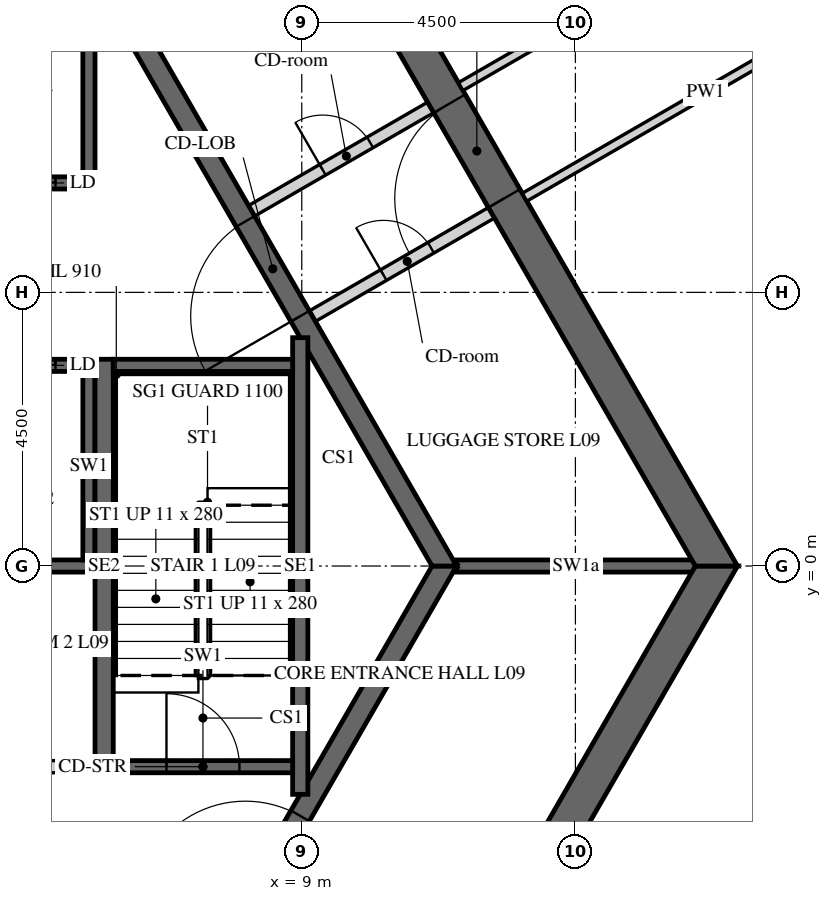
"""IFC4 building model, lengths in metres.
Left out: names, types, materials, properties, quantities, classifications, styles, units other than length and angle.
Written with IfcOpenShell. Run it as: python <this file> out.ifc"""

import sys

from ifc_helpers import new_model, si_unit, direction, frame, frame_2d, origin, place, context, subcontext, project, spatial, polyline, rectangle, outline, extrude, element, fill, save


model = new_model("IFC4")
c1 = context("Model", 3, precision=1e-05, world=origin(), true_north=direction((0.0, 1.0)))
c2 = subcontext(c1, "Body", "Model", "MODEL_VIEW")
j1 = project(units=[si_unit("LENGTHUNIT", "METRE"), si_unit("PLANEANGLEUNIT", "RADIAN")], contexts=[c1])
p1 = place(None, origin())
s1 = spatial("IfcSite", under=j1, at=p1, CompositionType="ELEMENT")
p2 = place(p1, origin())
s2 = spatial("IfcBuilding", under=s1, at=p2, CompositionType="ELEMENT")
p3 = place(p2, frame((0.0, 0.0, 49.2)))
s3 = spatial("IfcBuildingStorey", under=s2, at=p3, CompositionType="ELEMENT", Elevation=49.2)
p4 = place(p3, frame((7.91, -13.7, -0.15), z_axis=(0.0, 0.0, 1.0), x_axis=(0.499999880136, 0.866025472988, 0.0)))
e1 = element("IfcWall", 1, at=p4, inside=s3, PredefinedType="SHEAR", context=c2, shape_type="SweptSolid", body=[
    extrude(outline(polyline([(-0.173, -0.3), (15.993, -0.3), (15.646, 0.3), (0.173, 0.3), (-0.173, -0.3)])), origin(), (0.0, 0.0, 1.0), 3.9),
])
p5 = place(p4, frame((7.039, 0.0, 0.15)))
e2 = element("IfcOpeningElement", 2, at=p5, cuts=e1, PredefinedType="OPENING", context=c2, shape_type="SweptSolid", body=[
    extrude(rectangle(XDim=1.8, YDim=2.4, at=frame_2d((0.9, 1.2))), frame((0.0, 0.31, 0.0), z_axis=(0.0, -1.0, 0.0), x_axis=(1.0, 0.0, 0.0)), (0.0, 0.0, 1.0), 0.62),
])
p6 = place(p3, frame((15.819, 0.0, -0.15), z_axis=(0.0, 0.0, 1.0), x_axis=(-0.499999880136, 0.866025472988, 0.0)))
e3 = element("IfcWall", 3, at=p6, inside=s3, PredefinedType="SHEAR", context=c2, shape_type="SweptSolid", body=[
    extrude(outline(polyline([(-0.173, -0.3), (15.993, -0.3), (15.646, 0.3), (0.173, 0.3), (-0.173, -0.3)])), origin(), (0.0, 0.0, 1.0), 3.9),
])
p7 = place(p6, frame((6.981, 0.0, 0.15)))
e4 = element("IfcOpeningElement", 4, at=p7, cuts=e3, PredefinedType="OPENING", context=c2, shape_type="SweptSolid", body=[
    extrude(rectangle(XDim=1.8, YDim=2.4, at=frame_2d((0.9, 1.2))), frame((0.0, 0.31, 0.0), z_axis=(0.0, -1.0, 0.0), x_axis=(1.0, 0.0, 0.0)), (0.0, 0.0, 1.0), 0.62),
])
p8 = place(p3, frame((5.673, -9.825, -0.15), z_axis=(0.0, 0.0, 1.0), x_axis=(0.499995046907, 0.866028263435, 0.0)))
e5 = element("IfcWall", 5, at=p8, inside=s3, PredefinedType="SHEAR", context=c2, shape_type="SweptSolid", body=[
    extrude(outline(polyline([(-0.101, -0.175), (11.446, -0.175), (11.244, 0.175), (0.101, 0.175), (-0.101, -0.175)])), origin(), (0.0, 0.0, 1.0), 3.9),
])
p9 = place(p8, frame((4.801, 0.0, 0.15)))
e6 = element("IfcOpeningElement", 6, at=p9, cuts=e5, PredefinedType="OPENING", context=c2, shape_type="SweptSolid", body=[
    extrude(rectangle(XDim=1.8, YDim=2.4, at=frame_2d((0.9, 1.2))), frame((0.0, 0.185, 0.0), z_axis=(0.0, -1.0, 0.0), x_axis=(1.0, 0.0, 0.0)), (0.0, 0.0, 1.0), 0.37),
])
p10 = place(p3, frame((11.345, 0.0, -0.15), z_axis=(0.0, 0.0, 1.0), x_axis=(-0.499995046907, 0.866028263435, 0.0)))
e7 = element("IfcWall", 7, at=p10, inside=s3, PredefinedType="SHEAR", context=c2, shape_type="SweptSolid", body=[
    extrude(outline(polyline([(-0.101, -0.175), (11.446, -0.175), (11.244, 0.175), (0.101, 0.175), (-0.101, -0.175)])), origin(), (0.0, 0.0, 1.0), 3.9),
])
p11 = place(p10, frame((4.744, 0.0, 0.15)))
e8 = element("IfcOpeningElement", 8, at=p11, cuts=e7, PredefinedType="OPENING", context=c2, shape_type="SweptSolid", body=[
    extrude(rectangle(XDim=1.8, YDim=2.4, at=frame_2d((0.9, 1.2))), frame((0.0, 0.185, 0.0), z_axis=(0.0, -1.0, 0.0), x_axis=(1.0, 0.0, 0.0)), (0.0, 0.0, 1.0), 0.37),
])
p12 = place(p3, frame((-5.6, 6.3, -0.25), z_axis=(0.0, 0.0, 1.0), x_axis=(1.0, 0.0, 0.0)))
e9 = element("IfcWall", 9, at=p12, inside=s3, PredefinedType="SHEAR", context=c2, shape_type="SweptSolid", body=[
    extrude(rectangle(XDim=11.2, YDim=0.2, at=frame_2d((5.6, 0.0))), origin(), (0.0, 0.0, 1.0), 3.9),
])
p13 = place(p12, frame((0.65, 0.0, 0.25)))
e10 = element("IfcOpeningElement", 10, at=p13, cuts=e9, PredefinedType="OPENING", context=c2, shape_type="SweptSolid", body=[
    extrude(rectangle(XDim=1.1, YDim=2.1, at=frame_2d((0.55, 1.05))), frame((0.0, 0.11, 0.0), z_axis=(0.0, -1.0, 0.0), x_axis=(1.0, 0.0, 0.0)), (0.0, 0.0, 1.0), 0.22),
])
p14 = place(p12, frame((2.85, 0.0, 0.25)))
e11 = element("IfcOpeningElement", 11, at=p14, cuts=e9, PredefinedType="OPENING", context=c2, shape_type="SweptSolid", body=[
    extrude(rectangle(XDim=1.1, YDim=2.1, at=frame_2d((0.55, 1.05))), frame((0.0, 0.11, 0.0), z_axis=(0.0, -1.0, 0.0), x_axis=(1.0, 0.0, 0.0)), (0.0, 0.0, 1.0), 0.22),
])
p15 = place(p12, frame((5.05, 0.0, 0.25)))
e12 = element("IfcOpeningElement", 12, at=p15, cuts=e9, PredefinedType="OPENING", context=c2, shape_type="SweptSolid", body=[
    extrude(rectangle(XDim=1.1, YDim=2.1, at=frame_2d((0.55, 1.05))), frame((0.0, 0.11, 0.0), z_axis=(0.0, -1.0, 0.0), x_axis=(1.0, 0.0, 0.0)), (0.0, 0.0, 1.0), 0.22),
])
p16 = place(p12, frame((7.25, 0.0, 0.25)))
e13 = element("IfcOpeningElement", 13, at=p16, cuts=e9, PredefinedType="OPENING", context=c2, shape_type="SweptSolid", body=[
    extrude(rectangle(XDim=1.1, YDim=2.1, at=frame_2d((0.55, 1.05))), frame((0.0, 0.11, 0.0), z_axis=(0.0, -1.0, 0.0), x_axis=(1.0, 0.0, 0.0)), (0.0, 0.0, 1.0), 0.22),
])
p17 = place(p12, frame((9.45, 0.0, 0.25)))
e14 = element("IfcOpeningElement", 14, at=p17, cuts=e9, PredefinedType="OPENING", context=c2, shape_type="SweptSolid", body=[
    extrude(rectangle(XDim=1.1, YDim=2.1, at=frame_2d((0.55, 1.05))), frame((0.0, 0.11, 0.0), z_axis=(0.0, -1.0, 0.0), x_axis=(1.0, 0.0, 0.0)), (0.0, 0.0, 1.0), 0.22),
])
p18 = place(p3, frame((5.5, 6.4, -0.25), z_axis=(0.0, 0.0, 1.0), x_axis=(0.0, 1.0, 0.0)))
e15 = element("IfcWall", 15, at=p18, inside=s3, PredefinedType="SHEAR", context=c2, shape_type="SweptSolid", body=[
    extrude(rectangle(XDim=2.9, YDim=0.2, at=frame_2d((1.45, 0.0))), origin(), (0.0, 0.0, 1.0), 3.9),
])
p19 = place(p3, frame((-5.6, 3.3, -0.25), z_axis=(0.0, 0.0, 1.0), x_axis=(1.0, 0.0, 0.0)))
e16 = element("IfcWall", 16, at=p19, inside=s3, PredefinedType="SHEAR", context=c2, shape_type="SweptSolid", body=[
    extrude(rectangle(XDim=11.2, YDim=0.2, at=frame_2d((5.6, 0.0))), origin(), (0.0, 0.0, 1.0), 3.9),
])
p20 = place(p19, frame((0.65, 0.0, 0.25)))
e17 = element("IfcOpeningElement", 17, at=p20, cuts=e16, PredefinedType="OPENING", context=c2, shape_type="SweptSolid", body=[
    extrude(rectangle(XDim=1.1, YDim=2.1, at=frame_2d((0.55, 1.05))), frame((0.0, 0.11, 0.0), z_axis=(0.0, -1.0, 0.0), x_axis=(1.0, 0.0, 0.0)), (0.0, 0.0, 1.0), 0.22),
])
p21 = place(p19, frame((2.85, 0.0, 0.25)))
e18 = element("IfcOpeningElement", 18, at=p21, cuts=e16, PredefinedType="OPENING", context=c2, shape_type="SweptSolid", body=[
    extrude(rectangle(XDim=1.1, YDim=2.1, at=frame_2d((0.55, 1.05))), frame((0.0, 0.11, 0.0), z_axis=(0.0, -1.0, 0.0), x_axis=(1.0, 0.0, 0.0)), (0.0, 0.0, 1.0), 0.22),
])
p22 = place(p19, frame((5.05, 0.0, 0.25)))
e19 = element("IfcOpeningElement", 19, at=p22, cuts=e16, PredefinedType="OPENING", context=c2, shape_type="SweptSolid", body=[
    extrude(rectangle(XDim=1.1, YDim=2.1, at=frame_2d((0.55, 1.05))), frame((0.0, 0.11, 0.0), z_axis=(0.0, -1.0, 0.0), x_axis=(1.0, 0.0, 0.0)), (0.0, 0.0, 1.0), 0.22),
])
p23 = place(p19, frame((7.25, 0.0, 0.25)))
e20 = element("IfcOpeningElement", 20, at=p23, cuts=e16, PredefinedType="OPENING", context=c2, shape_type="SweptSolid", body=[
    extrude(rectangle(XDim=1.1, YDim=2.1, at=frame_2d((0.55, 1.05))), frame((0.0, 0.11, 0.0), z_axis=(0.0, -1.0, 0.0), x_axis=(1.0, 0.0, 0.0)), (0.0, 0.0, 1.0), 0.22),
])
p24 = place(p19, frame((9.45, 0.0, 0.25)))
e21 = element("IfcOpeningElement", 21, at=p24, cuts=e16, PredefinedType="OPENING", context=c2, shape_type="SweptSolid", body=[
    extrude(rectangle(XDim=1.1, YDim=2.1, at=frame_2d((0.55, 1.05))), frame((0.0, 0.11, 0.0), z_axis=(0.0, -1.0, 0.0), x_axis=(1.0, 0.0, 0.0)), (0.0, 0.0, 1.0), 0.22),
])
p25 = place(p3, frame((-5.6, 0.0, -0.25), z_axis=(0.0, 0.0, 1.0), x_axis=(1.0, 0.0, 0.0)))
e22 = element("IfcWall", 22, at=p25, inside=s3, PredefinedType="SHEAR", context=c2, shape_type="SweptSolid", body=[
    extrude(rectangle(XDim=11.2, YDim=0.2, at=frame_2d((5.6, 0.0))), origin(), (0.0, 0.0, 1.0), 3.9),
])
p26 = place(p3, frame((5.5, 0.1, -0.25), z_axis=(0.0, 0.0, 1.0), x_axis=(0.0, 1.0, 0.0)))
e23 = element("IfcWall", 23, at=p26, inside=s3, PredefinedType="SHEAR", context=c2, shape_type="SweptSolid", body=[
    extrude(rectangle(XDim=3.1, YDim=0.2, at=frame_2d((1.55, 0.0))), origin(), (0.0, 0.0, 1.0), 3.9),
])
p27 = place(p3, frame((0.1, -3.3, 0.0), z_axis=(0.0, 0.0, 1.0), x_axis=(1.0, 0.0, 0.0)))
e24 = element("IfcWall", 24, at=p27, inside=s3, PredefinedType="PARTITIONING", context=c2, shape_type="SweptSolid", body=[
    extrude(rectangle(XDim=5.5, YDim=0.2, at=frame_2d((2.75, 0.0))), origin(), (0.0, 0.0, 1.0), 3.65),
])
p28 = place(p27, frame((2.3, 0.0, 0.0)))
e25 = element("IfcOpeningElement", 25, at=p28, cuts=e24, PredefinedType="OPENING", context=c2, shape_type="SweptSolid", body=[
    extrude(rectangle(XDim=0.9, YDim=2.1, at=frame_2d((0.45, 1.05))), frame((0.0, 0.11, 0.0), z_axis=(0.0, -1.0, 0.0), x_axis=(1.0, 0.0, 0.0)), (0.0, 0.0, 1.0), 0.22),
])
p29 = place(p3, frame((11.547, 0.0, -0.15), z_axis=(0.0, 0.0, 1.0), x_axis=(1.0, 0.0, 0.0)))
e26 = element("IfcWall", 26, at=p29, inside=s3, PredefinedType="SHEAR", context=c2, shape_type="SweptSolid", body=[
    extrude(rectangle(XDim=3.926, YDim=0.2, at=frame_2d((1.963, 0.0))), origin(), (0.0, 0.0, 1.0), 3.9),
])
p30 = place(p3, frame((8.175, 5.841, 0.0), z_axis=(0.0, 0.0, 1.0), x_axis=(0.866020560687, 0.500008388397, 0.0)))
e27 = element("IfcWall", 27, at=p30, inside=s3, PredefinedType="PARTITIONING", context=c2, shape_type="SweptSolid", body=[
    extrude(rectangle(XDim=3.4, YDim=0.2, at=frame_2d((1.7, 0.0))), origin(), (0.0, 0.0, 1.0), 3.65),
])
p31 = place(p30, frame((1.35, 0.0, 0.0)))
e28 = element("IfcOpeningElement", 28, at=p31, cuts=e27, PredefinedType="OPENING", context=c2, shape_type="SweptSolid", body=[
    extrude(rectangle(XDim=0.9, YDim=2.1, at=frame_2d((0.45, 1.05))), frame((0.0, 0.11, 0.0), z_axis=(0.0, -1.0, 0.0), x_axis=(1.0, 0.0, 0.0)), (0.0, 0.0, 1.0), 0.22),
])
p32 = place(p3, frame((9.175, 4.109, 0.0), z_axis=(0.0, 0.0, 1.0), x_axis=(0.865989465428, 0.500062241894, 0.0)))
e29 = element("IfcWall", 29, at=p32, inside=s3, PredefinedType="PARTITIONING", context=c2, shape_type="SweptSolid", body=[
    extrude(rectangle(XDim=3.4, YDim=0.2, at=frame_2d((1.7, 0.0))), origin(), (0.0, 0.0, 1.0), 3.65),
])
p33 = place(p32, frame((1.351, 0.0, 0.0)))
e30 = element("IfcOpeningElement", 30, at=p33, cuts=e29, PredefinedType="OPENING", context=c2, shape_type="SweptSolid", body=[
    extrude(rectangle(XDim=0.9, YDim=2.1, at=frame_2d((0.45, 1.05))), frame((0.0, 0.11, 0.0), z_axis=(0.0, -1.0, 0.0), x_axis=(1.0, 0.0, 0.0)), (0.0, 0.0, 1.0), 0.22),
])
p34 = place(p3, frame((5.75, -3.4, -0.25), z_axis=(0.0, 0.0, 1.0), x_axis=(0.0, 1.0, 0.0)))
e31 = element("IfcWall", 31, at=p34, inside=s3, PredefinedType="SHEAR", context=c2, shape_type="SweptSolid", body=[
    extrude(rectangle(XDim=6.8, YDim=0.3, at=frame_2d((3.4, 0.0))), origin(), (0.0, 0.0, 1.0), 3.9),
])
p35 = place(p3, frame((8.975, -3.755, -0.25), z_axis=(0.0, 0.0, 1.0), x_axis=(0.0, 1.0, 0.0)))
e32 = element("IfcWall", 32, at=p35, inside=s3, PredefinedType="SHEAR", context=c2, shape_type="SweptSolid", body=[
    extrude(rectangle(XDim=7.51, YDim=0.25, at=frame_2d((3.755, 0.0))), origin(), (0.0, 0.0, 1.0), 3.9),
])
p36 = place(p3, frame((5.9, 3.3, -0.25), z_axis=(0.0, 0.0, 1.0), x_axis=(1.0, 0.0, 0.0)))
e33 = element("IfcWall", 33, at=p36, inside=s3, PredefinedType="SHEAR", context=c2, shape_type="SweptSolid", body=[
    extrude(rectangle(XDim=2.95, YDim=0.2, at=frame_2d((1.475, 0.0))), origin(), (0.0, 0.0, 1.0), 3.9),
])
p37 = place(p3, frame((5.9, -3.3, -0.25), z_axis=(0.0, 0.0, 1.0), x_axis=(1.0, 0.0, 0.0)))
e34 = element("IfcWall", 34, at=p37, inside=s3, PredefinedType="SHEAR", context=c2, shape_type="SweptSolid", body=[
    extrude(rectangle(XDim=2.95, YDim=0.2, at=frame_2d((1.475, 0.0))), origin(), (0.0, 0.0, 1.0), 3.9),
])
p38 = place(p37, frame((0.875, 0.0, 0.25)))
e35 = element("IfcOpeningElement", 35, at=p38, cuts=e34, PredefinedType="OPENING", context=c2, shape_type="SweptSolid", body=[
    extrude(rectangle(XDim=1.2, YDim=2.4, at=frame_2d((0.6, 1.2))), frame((0.0, 0.11, 0.0), z_axis=(0.0, -1.0, 0.0), x_axis=(1.0, 0.0, 0.0)), (0.0, 0.0, 1.0), 0.22),
])
p39 = place(p3, frame((14.275, -20.375, 0.0), z_axis=(0.0, 0.0, 1.0), x_axis=(0.500001098408, 0.866024769617, 0.0)))
e36 = element("IfcWall", 36, at=p39, inside=s3, PredefinedType="PARTITIONING", context=c2, shape_type="SweptSolid", body=[
    extrude(rectangle(XDim=24.599, YDim=0.15, at=frame_2d((12.299, 0.0))), origin(), (0.0, 0.0, 1.0), 2.988),
])
p40 = place(p39, frame((3.016, 0.0, 0.0)))
e37 = element("IfcOpeningElement", 37, at=p40, cuts=e36, PredefinedType="OPENING", context=c2, shape_type="SweptSolid", body=[
    extrude(rectangle(XDim=1.0, YDim=2.1, at=frame_2d((0.5, 1.05))), frame((0.0, 0.085, 0.0), z_axis=(0.0, -1.0, 0.0), x_axis=(1.0, 0.0, 0.0)), (0.0, 0.0, 1.0), 0.17),
])
p41 = place(p39, frame((10.019, 0.0, 0.0)))
e38 = element("IfcOpeningElement", 38, at=p41, cuts=e36, PredefinedType="OPENING", context=c2, shape_type="SweptSolid", body=[
    extrude(rectangle(XDim=1.0, YDim=2.1, at=frame_2d((0.5, 1.05))), frame((0.0, 0.085, 0.0), z_axis=(0.0, -1.0, 0.0), x_axis=(1.0, 0.0, 0.0)), (0.0, 0.0, 1.0), 0.17),
])
p42 = place(p39, frame((22.459, 0.0, 0.0)))
e39 = element("IfcOpeningElement", 39, at=p42, cuts=e36, PredefinedType="OPENING", context=c2, shape_type="SweptSolid", body=[
    extrude(rectangle(XDim=1.0, YDim=2.1, at=frame_2d((0.5, 1.05))), frame((0.0, 0.085, 0.0), z_axis=(0.0, -1.0, 0.0), x_axis=(1.0, 0.0, 0.0)), (0.0, 0.0, 1.0), 0.17),
])
p43 = place(p3, frame((26.528, 0.997, 0.0), z_axis=(0.0, 0.0, 1.0), x_axis=(-0.559192121846, 0.829038099767, 0.0)))
e40 = element("IfcWall", 40, at=p43, inside=s3, PredefinedType="PARTITIONING", context=c2, shape_type="SweptSolid", body=[
    extrude(rectangle(XDim=22.586, YDim=0.15, at=frame_2d((11.293, 0.0))), origin(), (0.0, 0.0, 1.0), 2.988),
])
p44 = place(p43, frame((11.696, 0.0, 0.0)))
e41 = element("IfcOpeningElement", 41, at=p44, cuts=e40, PredefinedType="OPENING", context=c2, shape_type="SweptSolid", body=[
    extrude(rectangle(XDim=1.0, YDim=2.1, at=frame_2d((0.5, 1.05))), frame((0.0, 0.085, 0.0), z_axis=(0.0, -1.0, 0.0), x_axis=(1.0, 0.0, 0.0)), (0.0, 0.0, 1.0), 0.17),
])
p45 = place(p43, frame((17.733, 0.0, 0.0)))
e42 = element("IfcOpeningElement", 42, at=p45, cuts=e40, PredefinedType="OPENING", context=c2, shape_type="SweptSolid", body=[
    extrude(rectangle(XDim=1.0, YDim=2.1, at=frame_2d((0.5, 1.05))), frame((0.0, 0.085, 0.0), z_axis=(0.0, -1.0, 0.0), x_axis=(1.0, 0.0, 0.0)), (0.0, 0.0, 1.0), 0.17),
])
p46 = place(p3, frame((12.664, 6.066, 0.0), z_axis=(0.0, 0.0, 1.0), x_axis=(0.866027716353, 0.499995994493, 0.0)))
e43 = element("IfcWall", 43, at=p46, inside=s3, PredefinedType="PARTITIONING", context=c2, shape_type="SweptSolid", body=[
    extrude(rectangle(XDim=6.876, YDim=0.15, at=frame_2d((3.438, 0.0))), origin(), (0.0, 0.0, 1.0), 2.988),
])
p47 = place(p3, frame((17.376, 11.211, 0.0), z_axis=(0.0, 0.0, 1.0), x_axis=(-0.866021841149, -0.500006170614, 0.0)))
e44 = element("IfcWall", 44, at=p47, inside=s3, PredefinedType="PARTITIONING", context=c2, shape_type="SweptSolid", body=[
    extrude(rectangle(XDim=6.654, YDim=0.15, at=frame_2d((3.327, 0.0))), origin(), (0.0, 0.0, 1.0), 2.988),
])
p48 = place(p7, origin())
e45 = element("IfcDoor", 45, at=p48, inside=s3, OperationType="DOUBLE_DOOR_SINGLE_SWING", PredefinedType="DOOR", context=c2, shape_type="SweptSolid", body=[
    extrude(rectangle(XDim=1.8, YDim=2.4, at=frame_2d((0.9, 1.2))), frame((0.0, 0.025, 0.0), z_axis=(0.0, -1.0, 0.0), x_axis=(1.0, 0.0, 0.0)), (0.0, 0.0, 1.0), 0.05),
])
fill(e4, e45)
p49 = place(p11, origin())
e46 = element("IfcDoor", 46, at=p49, inside=s3, OperationType="DOUBLE_DOOR_SINGLE_SWING", PredefinedType="DOOR", context=c2, shape_type="SweptSolid", body=[
    extrude(rectangle(XDim=1.8, YDim=2.4, at=frame_2d((0.9, 1.2))), frame((0.0, 0.025, 0.0), z_axis=(0.0, -1.0, 0.0), x_axis=(1.0, 0.0, 0.0)), (0.0, 0.0, 1.0), 0.05),
])
fill(e8, e46)
p50 = place(p9, origin())
e47 = element("IfcDoor", 47, at=p50, inside=s3, OperationType="DOUBLE_DOOR_SINGLE_SWING", PredefinedType="DOOR", context=c2, shape_type="SweptSolid", body=[
    extrude(rectangle(XDim=1.8, YDim=2.4, at=frame_2d((0.9, 1.2))), frame((0.0, 0.025, 0.0), z_axis=(0.0, -1.0, 0.0), x_axis=(1.0, 0.0, 0.0)), (0.0, 0.0, 1.0), 0.05),
])
fill(e6, e47)
p51 = place(p31, origin())
e48 = element("IfcDoor", 48, at=p51, inside=s3, OperationType="SINGLE_SWING_LEFT", PredefinedType="DOOR", context=c2, shape_type="SweptSolid", body=[
    extrude(rectangle(XDim=0.9, YDim=2.1, at=frame_2d((0.45, 1.05))), frame((0.0, 0.025, 0.0), z_axis=(0.0, -1.0, 0.0), x_axis=(1.0, 0.0, 0.0)), (0.0, 0.0, 1.0), 0.05),
])
fill(e28, e48)
p52 = place(p33, origin())
e49 = element("IfcDoor", 49, at=p52, inside=s3, OperationType="SINGLE_SWING_LEFT", PredefinedType="DOOR", context=c2, shape_type="SweptSolid", body=[
    extrude(rectangle(XDim=0.9, YDim=2.1, at=frame_2d((0.45, 1.05))), frame((0.0, 0.025, 0.0), z_axis=(0.0, -1.0, 0.0), x_axis=(1.0, 0.0, 0.0)), (0.0, 0.0, 1.0), 0.05),
])
fill(e30, e49)
p53 = place(p38, origin())
e50 = element("IfcDoor", 50, at=p53, inside=s3, OperationType="SINGLE_SWING_LEFT", PredefinedType="DOOR", context=c2, shape_type="SweptSolid", body=[
    extrude(rectangle(XDim=1.2, YDim=2.4, at=frame_2d((0.6, 1.2))), frame((0.0, 0.025, 0.0), z_axis=(0.0, -1.0, 0.0), x_axis=(1.0, 0.0, 0.0)), (0.0, 0.0, 1.0), 0.05),
])
fill(e35, e50)
p54 = place(p17, origin())
e51 = element("IfcDoor", 51, at=p54, inside=s3, OperationType="SLIDING_TO_LEFT", PredefinedType="DOOR", context=c2, shape_type="SweptSolid", body=[
    extrude(rectangle(XDim=1.1, YDim=2.1, at=frame_2d((0.55, 1.05))), frame((0.0, 0.025, 0.0), z_axis=(0.0, -1.0, 0.0), x_axis=(1.0, 0.0, 0.0)), (0.0, 0.0, 1.0), 0.05),
])
fill(e14, e51)
p55 = place(p24, origin())
e52 = element("IfcDoor", 52, at=p55, inside=s3, OperationType="SLIDING_TO_LEFT", PredefinedType="DOOR", context=c2, shape_type="SweptSolid", body=[
    extrude(rectangle(XDim=1.1, YDim=2.1, at=frame_2d((0.55, 1.05))), frame((0.0, 0.025, 0.0), z_axis=(0.0, -1.0, 0.0), x_axis=(1.0, 0.0, 0.0)), (0.0, 0.0, 1.0), 0.05),
])
fill(e21, e52)
save(model, sys.argv[1])
